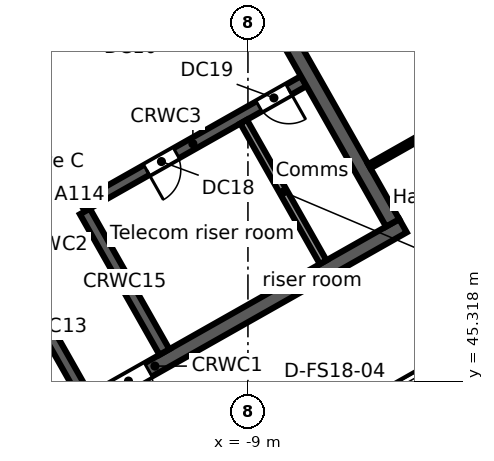
"""IFC4 building model, lengths in metres.
Left out: names, types, materials, properties, quantities, classifications, styles, units other than length and angle.
Written with IfcOpenShell. Run it as: python <this file> out.ifc"""

import sys

from ifc_helpers import new_model, si_unit, direction, frame, frame_2d, origin, place, context, subcontext, project, spatial, rectangle, extrude, element, fill, save


model = new_model("IFC4")
c1 = context("Model", 3, precision=1e-05, world=origin(), true_north=direction((0.0, 1.0)))
c2 = subcontext(c1, "Body", "Model", "MODEL_VIEW")
j1 = project(units=[si_unit("LENGTHUNIT", "METRE"), si_unit("PLANEANGLEUNIT", "RADIAN")], contexts=[c1])
p1 = place(None, origin())
s1 = spatial("IfcSite", under=j1, at=p1, CompositionType="ELEMENT")
p2 = place(p1, origin())
s2 = spatial("IfcBuilding", under=s1, at=p2, CompositionType="ELEMENT")
p3 = place(p2, frame((0.0, 0.0, 277.9)))
s3 = spatial("IfcBuildingStorey", under=s2, at=p3, CompositionType="ELEMENT", Elevation=277.9)
p4 = place(p3, frame((-58.732, 38.771, 0.0), z_axis=(0.0, 0.0, 1.0), x_axis=(0.870355615581, 0.492423702137, 0.0)))
e1 = element("IfcWall", 1, at=p4, inside=s3, PredefinedType="STANDARD", context=c2, shape_type="SweptSolid", body=[
    extrude(rectangle(XDim=64.052, YDim=0.25, at=frame_2d((32.026, 0.0))), origin(), (0.0, 0.0, 1.0), 3.52),
])
p5 = place(p4, frame((61.259, 0.0, 0.8)))
e2 = element("IfcOpeningElement", 2, at=p5, cuts=e1, PredefinedType="OPENING", context=c2, shape_type="SweptSolid", body=[
    extrude(rectangle(XDim=2.4, YDim=2.2, at=frame_2d((1.2, 1.1))), frame((0.0, 0.135, 0.0), z_axis=(0.0, -1.0, 0.0), x_axis=(1.0, 0.0, 0.0)), (0.0, 0.0, 1.0), 0.27),
])
p6 = place(p4, frame((58.216, 0.0, 0.8)))
e3 = element("IfcOpeningElement", 3, at=p6, cuts=e1, PredefinedType="OPENING", context=c2, shape_type="SweptSolid", body=[
    extrude(rectangle(XDim=2.4, YDim=2.2, at=frame_2d((1.2, 1.1))), frame((0.0, 0.135, 0.0), z_axis=(0.0, -1.0, 0.0), x_axis=(1.0, 0.0, 0.0)), (0.0, 0.0, 1.0), 0.27),
])
p7 = place(p4, frame((55.173, 0.0, 0.8)))
e4 = element("IfcOpeningElement", 4, at=p7, cuts=e1, PredefinedType="OPENING", context=c2, shape_type="SweptSolid", body=[
    extrude(rectangle(XDim=2.4, YDim=2.2, at=frame_2d((1.2, 1.1))), frame((0.0, 0.135, 0.0), z_axis=(0.0, -1.0, 0.0), x_axis=(1.0, 0.0, 0.0)), (0.0, 0.0, 1.0), 0.27),
])
p8 = place(p4, frame((52.129, 0.0, 0.8)))
e5 = element("IfcOpeningElement", 5, at=p8, cuts=e1, PredefinedType="OPENING", context=c2, shape_type="SweptSolid", body=[
    extrude(rectangle(XDim=2.4, YDim=2.2, at=frame_2d((1.2, 1.1))), frame((0.0, 0.135, 0.0), z_axis=(0.0, -1.0, 0.0), x_axis=(1.0, 0.0, 0.0)), (0.0, 0.0, 1.0), 0.27),
])
p9 = place(p4, frame((49.086, 0.0, 0.8)))
e6 = element("IfcOpeningElement", 6, at=p9, cuts=e1, PredefinedType="OPENING", context=c2, shape_type="SweptSolid", body=[
    extrude(rectangle(XDim=2.4, YDim=2.2, at=frame_2d((1.2, 1.1))), frame((0.0, 0.135, 0.0), z_axis=(0.0, -1.0, 0.0), x_axis=(1.0, 0.0, 0.0)), (0.0, 0.0, 1.0), 0.27),
])
p10 = place(p4, frame((46.043, 0.0, 0.8)))
e7 = element("IfcOpeningElement", 7, at=p10, cuts=e1, PredefinedType="OPENING", context=c2, shape_type="SweptSolid", body=[
    extrude(rectangle(XDim=2.4, YDim=2.2, at=frame_2d((1.2, 1.1))), frame((0.0, 0.135, 0.0), z_axis=(0.0, -1.0, 0.0), x_axis=(1.0, 0.0, 0.0)), (0.0, 0.0, 1.0), 0.27),
])
p11 = place(p4, frame((43.0, 0.0, 0.8)))
e8 = element("IfcOpeningElement", 8, at=p11, cuts=e1, PredefinedType="OPENING", context=c2, shape_type="SweptSolid", body=[
    extrude(rectangle(XDim=2.4, YDim=2.2, at=frame_2d((1.2, 1.1))), frame((0.0, 0.135, 0.0), z_axis=(0.0, -1.0, 0.0), x_axis=(1.0, 0.0, 0.0)), (0.0, 0.0, 1.0), 0.27),
])
p12 = place(p4, frame((39.956, 0.0, 0.8)))
e9 = element("IfcOpeningElement", 9, at=p12, cuts=e1, PredefinedType="OPENING", context=c2, shape_type="SweptSolid", body=[
    extrude(rectangle(XDim=2.4, YDim=2.2, at=frame_2d((1.2, 1.1))), frame((0.0, 0.135, 0.0), z_axis=(0.0, -1.0, 0.0), x_axis=(1.0, 0.0, 0.0)), (0.0, 0.0, 1.0), 0.27),
])
p13 = place(p4, frame((36.913, 0.0, 0.8)))
e10 = element("IfcOpeningElement", 10, at=p13, cuts=e1, PredefinedType="OPENING", context=c2, shape_type="SweptSolid", body=[
    extrude(rectangle(XDim=2.4, YDim=2.2, at=frame_2d((1.2, 1.1))), frame((0.0, 0.135, 0.0), z_axis=(0.0, -1.0, 0.0), x_axis=(1.0, 0.0, 0.0)), (0.0, 0.0, 1.0), 0.27),
])
p14 = place(p4, frame((33.87, 0.0, 0.8)))
e11 = element("IfcOpeningElement", 11, at=p14, cuts=e1, PredefinedType="OPENING", context=c2, shape_type="SweptSolid", body=[
    extrude(rectangle(XDim=2.4, YDim=2.2, at=frame_2d((1.2, 1.1))), frame((0.0, 0.135, 0.0), z_axis=(0.0, -1.0, 0.0), x_axis=(1.0, 0.0, 0.0)), (0.0, 0.0, 1.0), 0.27),
])
p15 = place(p4, frame((30.826, 0.0, 0.8)))
e12 = element("IfcOpeningElement", 12, at=p15, cuts=e1, PredefinedType="OPENING", context=c2, shape_type="SweptSolid", body=[
    extrude(rectangle(XDim=2.4, YDim=2.2, at=frame_2d((1.2, 1.1))), frame((0.0, 0.135, 0.0), z_axis=(0.0, -1.0, 0.0), x_axis=(1.0, 0.0, 0.0)), (0.0, 0.0, 1.0), 0.27),
])
p16 = place(p4, frame((27.783, 0.0, 0.8)))
e13 = element("IfcOpeningElement", 13, at=p16, cuts=e1, PredefinedType="OPENING", context=c2, shape_type="SweptSolid", body=[
    extrude(rectangle(XDim=2.4, YDim=2.2, at=frame_2d((1.2, 1.1))), frame((0.0, 0.135, 0.0), z_axis=(0.0, -1.0, 0.0), x_axis=(1.0, 0.0, 0.0)), (0.0, 0.0, 1.0), 0.27),
])
p17 = place(p4, frame((24.74, 0.0, 0.8)))
e14 = element("IfcOpeningElement", 14, at=p17, cuts=e1, PredefinedType="OPENING", context=c2, shape_type="SweptSolid", body=[
    extrude(rectangle(XDim=2.4, YDim=2.2, at=frame_2d((1.2, 1.1))), frame((0.0, 0.135, 0.0), z_axis=(0.0, -1.0, 0.0), x_axis=(1.0, 0.0, 0.0)), (0.0, 0.0, 1.0), 0.27),
])
p18 = place(p4, frame((21.696, 0.0, 0.8)))
e15 = element("IfcOpeningElement", 15, at=p18, cuts=e1, PredefinedType="OPENING", context=c2, shape_type="SweptSolid", body=[
    extrude(rectangle(XDim=2.4, YDim=2.2, at=frame_2d((1.2, 1.1))), frame((0.0, 0.135, 0.0), z_axis=(0.0, -1.0, 0.0), x_axis=(1.0, 0.0, 0.0)), (0.0, 0.0, 1.0), 0.27),
])
p19 = place(p4, frame((18.653, 0.0, 0.8)))
e16 = element("IfcOpeningElement", 16, at=p19, cuts=e1, PredefinedType="OPENING", context=c2, shape_type="SweptSolid", body=[
    extrude(rectangle(XDim=2.4, YDim=2.2, at=frame_2d((1.2, 1.1))), frame((0.0, 0.135, 0.0), z_axis=(0.0, -1.0, 0.0), x_axis=(1.0, 0.0, 0.0)), (0.0, 0.0, 1.0), 0.27),
])
p20 = place(p4, frame((15.61, 0.0, 0.8)))
e17 = element("IfcOpeningElement", 17, at=p20, cuts=e1, PredefinedType="OPENING", context=c2, shape_type="SweptSolid", body=[
    extrude(rectangle(XDim=2.4, YDim=2.2, at=frame_2d((1.2, 1.1))), frame((0.0, 0.135, 0.0), z_axis=(0.0, -1.0, 0.0), x_axis=(1.0, 0.0, 0.0)), (0.0, 0.0, 1.0), 0.27),
])
p21 = place(p4, frame((12.567, 0.0, 0.8)))
e18 = element("IfcOpeningElement", 18, at=p21, cuts=e1, PredefinedType="OPENING", context=c2, shape_type="SweptSolid", body=[
    extrude(rectangle(XDim=2.4, YDim=2.2, at=frame_2d((1.2, 1.1))), frame((0.0, 0.135, 0.0), z_axis=(0.0, -1.0, 0.0), x_axis=(1.0, 0.0, 0.0)), (0.0, 0.0, 1.0), 0.27),
])
p22 = place(p4, frame((9.523, 0.0, 0.8)))
e19 = element("IfcOpeningElement", 19, at=p22, cuts=e1, PredefinedType="OPENING", context=c2, shape_type="SweptSolid", body=[
    extrude(rectangle(XDim=2.4, YDim=2.2, at=frame_2d((1.2, 1.1))), frame((0.0, 0.135, 0.0), z_axis=(0.0, -1.0, 0.0), x_axis=(1.0, 0.0, 0.0)), (0.0, 0.0, 1.0), 0.27),
])
p23 = place(p4, frame((6.48, 0.0, 0.8)))
e20 = element("IfcOpeningElement", 20, at=p23, cuts=e1, PredefinedType="OPENING", context=c2, shape_type="SweptSolid", body=[
    extrude(rectangle(XDim=2.4, YDim=2.2, at=frame_2d((1.2, 1.1))), frame((0.0, 0.135, 0.0), z_axis=(0.0, -1.0, 0.0), x_axis=(1.0, 0.0, 0.0)), (0.0, 0.0, 1.0), 0.27),
])
p24 = place(p4, frame((3.437, 0.0, 0.8)))
e21 = element("IfcOpeningElement", 21, at=p24, cuts=e1, PredefinedType="OPENING", context=c2, shape_type="SweptSolid", body=[
    extrude(rectangle(XDim=2.4, YDim=2.2, at=frame_2d((1.2, 1.1))), frame((0.0, 0.135, 0.0), z_axis=(0.0, -1.0, 0.0), x_axis=(1.0, 0.0, 0.0)), (0.0, 0.0, 1.0), 0.27),
])
p25 = place(p4, frame((0.393, 0.0, 0.8)))
e22 = element("IfcOpeningElement", 22, at=p25, cuts=e1, PredefinedType="OPENING", context=c2, shape_type="SweptSolid", body=[
    extrude(rectangle(XDim=2.4, YDim=2.2, at=frame_2d((1.2, 1.1))), frame((0.0, 0.135, 0.0), z_axis=(0.0, -1.0, 0.0), x_axis=(1.0, 0.0, 0.0)), (0.0, 0.0, 1.0), 0.27),
])
p26 = place(p3, frame((-3.017, 46.293, 0.0), z_axis=(0.0, 0.0, 1.0), x_axis=(-0.870355474887, -0.492423950812, 0.0)))
e23 = element("IfcWall", 23, at=p26, inside=s3, PredefinedType="STANDARD", context=c2, shape_type="SweptSolid", body=[
    extrude(rectangle(XDim=40.34, YDim=0.25, at=frame_2d((20.17, 0.0))), origin(), (0.0, 0.0, 1.0), 3.52),
])
p27 = place(p26, frame((37.428, 0.0, 0.8)))
e24 = element("IfcOpeningElement", 24, at=p27, cuts=e23, PredefinedType="OPENING", context=c2, shape_type="SweptSolid", body=[
    extrude(rectangle(XDim=2.4, YDim=2.2, at=frame_2d((1.2, 1.1))), frame((0.0, 0.135, 0.0), z_axis=(0.0, -1.0, 0.0), x_axis=(1.0, 0.0, 0.0)), (0.0, 0.0, 1.0), 0.27),
])
p28 = place(p26, frame((34.372, 0.0, 0.0)))
e25 = element("IfcOpeningElement", 25, at=p28, cuts=e23, PredefinedType="OPENING", context=c2, shape_type="SweptSolid", body=[
    extrude(rectangle(XDim=1.8, YDim=2.4, at=frame_2d((0.9, 1.2))), frame((0.0, 0.135, 0.0), z_axis=(0.0, -1.0, 0.0), x_axis=(1.0, 0.0, 0.0)), (0.0, 0.0, 1.0), 0.27),
])
p29 = place(p26, frame((30.716, 0.0, 0.8)))
e26 = element("IfcOpeningElement", 26, at=p29, cuts=e23, PredefinedType="OPENING", context=c2, shape_type="SweptSolid", body=[
    extrude(rectangle(XDim=2.4, YDim=2.2, at=frame_2d((1.2, 1.1))), frame((0.0, 0.135, 0.0), z_axis=(0.0, -1.0, 0.0), x_axis=(1.0, 0.0, 0.0)), (0.0, 0.0, 1.0), 0.27),
])
p30 = place(p26, frame((27.36, 0.0, 0.8)))
e27 = element("IfcOpeningElement", 27, at=p30, cuts=e23, PredefinedType="OPENING", context=c2, shape_type="SweptSolid", body=[
    extrude(rectangle(XDim=2.4, YDim=2.2, at=frame_2d((1.2, 1.1))), frame((0.0, 0.135, 0.0), z_axis=(0.0, -1.0, 0.0), x_axis=(1.0, 0.0, 0.0)), (0.0, 0.0, 1.0), 0.27),
])
p31 = place(p26, frame((24.304, 0.0, 0.0)))
e28 = element("IfcOpeningElement", 28, at=p31, cuts=e23, PredefinedType="OPENING", context=c2, shape_type="SweptSolid", body=[
    extrude(rectangle(XDim=1.8, YDim=2.4, at=frame_2d((0.9, 1.2))), frame((0.0, 0.135, 0.0), z_axis=(0.0, -1.0, 0.0), x_axis=(1.0, 0.0, 0.0)), (0.0, 0.0, 1.0), 0.27),
])
p32 = place(p26, frame((20.648, 0.0, 0.8)))
e29 = element("IfcOpeningElement", 29, at=p32, cuts=e23, PredefinedType="OPENING", context=c2, shape_type="SweptSolid", body=[
    extrude(rectangle(XDim=2.4, YDim=2.2, at=frame_2d((1.2, 1.1))), frame((0.0, 0.135, 0.0), z_axis=(0.0, -1.0, 0.0), x_axis=(1.0, 0.0, 0.0)), (0.0, 0.0, 1.0), 0.27),
])
p33 = place(p26, frame((17.292, 0.0, 0.8)))
e30 = element("IfcOpeningElement", 30, at=p33, cuts=e23, PredefinedType="OPENING", context=c2, shape_type="SweptSolid", body=[
    extrude(rectangle(XDim=2.4, YDim=2.2, at=frame_2d((1.2, 1.1))), frame((0.0, 0.135, 0.0), z_axis=(0.0, -1.0, 0.0), x_axis=(1.0, 0.0, 0.0)), (0.0, 0.0, 1.0), 0.27),
])
p34 = place(p26, frame((14.236, 0.0, 0.0)))
e31 = element("IfcOpeningElement", 31, at=p34, cuts=e23, PredefinedType="OPENING", context=c2, shape_type="SweptSolid", body=[
    extrude(rectangle(XDim=1.8, YDim=2.4, at=frame_2d((0.9, 1.2))), frame((0.0, 0.135, 0.0), z_axis=(0.0, -1.0, 0.0), x_axis=(1.0, 0.0, 0.0)), (0.0, 0.0, 1.0), 0.27),
])
p35 = place(p26, frame((10.58, 0.0, 0.8)))
e32 = element("IfcOpeningElement", 32, at=p35, cuts=e23, PredefinedType="OPENING", context=c2, shape_type="SweptSolid", body=[
    extrude(rectangle(XDim=2.4, YDim=2.2, at=frame_2d((1.2, 1.1))), frame((0.0, 0.135, 0.0), z_axis=(0.0, -1.0, 0.0), x_axis=(1.0, 0.0, 0.0)), (0.0, 0.0, 1.0), 0.27),
])
p36 = place(p26, frame((7.224, 0.0, 0.8)))
e33 = element("IfcOpeningElement", 33, at=p36, cuts=e23, PredefinedType="OPENING", context=c2, shape_type="SweptSolid", body=[
    extrude(rectangle(XDim=2.4, YDim=2.2, at=frame_2d((1.2, 1.1))), frame((0.0, 0.135, 0.0), z_axis=(0.0, -1.0, 0.0), x_axis=(1.0, 0.0, 0.0)), (0.0, 0.0, 1.0), 0.27),
])
p37 = place(p26, frame((4.168, 0.0, 0.0)))
e34 = element("IfcOpeningElement", 34, at=p37, cuts=e23, PredefinedType="OPENING", context=c2, shape_type="SweptSolid", body=[
    extrude(rectangle(XDim=1.8, YDim=2.4, at=frame_2d((0.9, 1.2))), frame((0.0, 0.135, 0.0), z_axis=(0.0, -1.0, 0.0), x_axis=(1.0, 0.0, 0.0)), (0.0, 0.0, 1.0), 0.27),
])
p38 = place(p26, frame((0.512, 0.0, 0.8)))
e35 = element("IfcOpeningElement", 35, at=p38, cuts=e23, PredefinedType="OPENING", context=c2, shape_type="SweptSolid", body=[
    extrude(rectangle(XDim=2.4, YDim=2.2, at=frame_2d((1.2, 1.1))), frame((0.0, 0.135, 0.0), z_axis=(0.0, -1.0, 0.0), x_axis=(1.0, 0.0, 0.0)), (0.0, 0.0, 1.0), 0.27),
])
p39 = place(p3, frame((-17.975, 42.017, 0.0), z_axis=(0.0, 0.0, 1.0), x_axis=(0.87034965173, 0.492434243055, 0.0)))
e36 = element("IfcWall", 36, at=p39, inside=s3, PredefinedType="SOLIDWALL", context=c2, shape_type="SweptSolid", body=[
    extrude(rectangle(XDim=15.0, YDim=0.4, at=frame_2d((7.5, 0.0))), origin(), (0.0, 0.0, 1.0), 3.52),
])
p40 = place(p39, frame((6.1, 0.0, 0.0)))
e37 = element("IfcOpeningElement", 37, at=p40, cuts=e36, PredefinedType="OPENING", context=c2, shape_type="SweptSolid", body=[
    extrude(rectangle(XDim=1.2, YDim=2.1, at=frame_2d((0.6, 1.05))), frame((0.0, 0.21, 0.0), z_axis=(0.0, -1.0, 0.0), x_axis=(1.0, 0.0, 0.0)), (0.0, 0.0, 1.0), 0.42),
])
p41 = place(p3, frame((-13.365, 49.911, 0.0), z_axis=(0.0, 0.0, 1.0), x_axis=(0.870347618718, 0.492437836272, 0.0)))
e38 = element("IfcWall", 38, at=p41, inside=s3, PredefinedType="SOLIDWALL", context=c2, shape_type="SweptSolid", body=[
    extrude(rectangle(XDim=6.7, YDim=0.3, at=frame_2d((3.35, 0.0))), origin(), (0.0, 0.0, 1.0), 3.52),
])
p42 = place(p41, frame((1.95, 0.0, 0.0)))
e39 = element("IfcOpeningElement", 39, at=p42, cuts=e38, PredefinedType="OPENING", context=c2, shape_type="SweptSolid", body=[
    extrude(rectangle(XDim=0.9, YDim=2.1, at=frame_2d((0.45, 1.05))), frame((0.0, 0.16, 0.0), z_axis=(0.0, -1.0, 0.0), x_axis=(1.0, 0.0, 0.0)), (0.0, 0.0, 1.0), 0.32),
])
p43 = place(p41, frame((5.35, 0.0, 0.0)))
e40 = element("IfcOpeningElement", 40, at=p43, cuts=e38, PredefinedType="OPENING", context=c2, shape_type="SweptSolid", body=[
    extrude(rectangle(XDim=0.9, YDim=2.1, at=frame_2d((0.45, 1.05))), frame((0.0, 0.16, 0.0), z_axis=(0.0, -1.0, 0.0), x_axis=(1.0, 0.0, 0.0)), (0.0, 0.0, 1.0), 0.32),
])
p44 = place(p3, frame((-15.618, 53.691, 0.0), z_axis=(0.0, 0.0, 1.0), x_axis=(0.870362830851, 0.492410948978, 0.0)))
e41 = element("IfcWall", 41, at=p44, inside=s3, PredefinedType="SOLIDWALL", context=c2, shape_type="SweptSolid", body=[
    extrude(rectangle(XDim=6.8, YDim=0.3, at=frame_2d((3.4, 0.0))), origin(), (0.0, 0.0, 1.0), 3.52),
])
p45 = place(p44, frame((3.0, 0.0, 0.0)))
e42 = element("IfcOpeningElement", 42, at=p45, cuts=e41, PredefinedType="OPENING", context=c2, shape_type="SweptSolid", body=[
    extrude(rectangle(XDim=0.9, YDim=2.1, at=frame_2d((0.45, 1.05))), frame((0.0, 0.16, 0.0), z_axis=(0.0, -1.0, 0.0), x_axis=(1.0, 0.0, 0.0)), (0.0, 0.0, 1.0), 0.32),
])
p46 = place(p3, frame((-24.672, 53.854, 0.0), z_axis=(0.0, 0.0, 1.0), x_axis=(0.870353598469, 0.492427267353, 0.0)))
e43 = element("IfcWall", 43, at=p46, inside=s3, PredefinedType="SOLIDWALL", context=c2, shape_type="SweptSolid", body=[
    extrude(rectangle(XDim=15.0, YDim=0.4, at=frame_2d((7.5, 0.0))), origin(), (0.0, 0.0, 1.0), 3.52),
])
p47 = place(p3, frame((-15.379, 48.599, 0.0), z_axis=(0.0, 0.0, 1.0), x_axis=(0.492422543467, -0.870356271124, 0.0)))
e44 = element("IfcWall", 44, at=p47, inside=s3, PredefinedType="SOLIDWALL", context=c2, shape_type="SweptSolid", body=[
    extrude(rectangle(XDim=4.25, YDim=0.3, at=frame_2d((2.125, 0.0))), origin(), (0.0, 0.0, 1.0), 3.52),
])
p48 = place(p3, frame((-13.291, 49.781, 0.0), z_axis=(0.0, 0.0, 1.0), x_axis=(0.492397924348, -0.870370199454, 0.0)))
e45 = element("IfcWall", 45, at=p48, inside=s3, PredefinedType="SOLIDWALL", context=c2, shape_type="SweptSolid", body=[
    extrude(rectangle(XDim=4.25, YDim=0.3, at=frame_2d((2.125, 0.0))), origin(), (0.0, 0.0, 1.0), 3.52),
])
p49 = place(p3, frame((-9.113, 52.144, 0.0), z_axis=(0.0, 0.0, 1.0), x_axis=(0.492422543467, -0.870356271124, 0.0)))
e46 = element("IfcWall", 46, at=p49, inside=s3, PredefinedType="PARTITIONING", context=c2, shape_type="SweptSolid", body=[
    extrude(rectangle(XDim=4.25, YDim=0.2, at=frame_2d((2.125, 0.0))), origin(), (0.0, 0.0, 1.0), 3.52),
])
p50 = place(p3, frame((-11.692, 60.968, 0.0), z_axis=(0.0, 0.0, 1.0), x_axis=(0.492421663121, -0.870356769198, 0.0)))
e47 = element("IfcWall", 47, at=p50, inside=s3, PredefinedType="SOLIDWALL", context=c2, shape_type="SweptSolid", body=[
    extrude(rectangle(XDim=13.2, YDim=0.4, at=frame_2d((6.6, 0.0))), origin(), (0.0, 0.0, 1.0), 3.52),
])
p51 = place(p3, frame((-5.806, 50.97, 0.0), z_axis=(0.0, 0.0, 1.0), x_axis=(0.870355163327, 0.492424501492, 0.0)))
e48 = element("IfcWall", 48, at=p51, inside=s3, PredefinedType="PARTITIONING", context=c2, shape_type="SweptSolid", body=[
    extrude(rectangle(XDim=6.527, YDim=0.125, at=frame_2d((3.264, 0.0))), origin(), (0.0, 0.0, 1.0), 2.8),
])
p52 = place(p51, frame((2.45, 0.0, 0.0)))
e49 = element("IfcOpeningElement", 49, at=p52, cuts=e48, PredefinedType="OPENING", context=c2, shape_type="SweptSolid", body=[
    extrude(rectangle(XDim=1.8, YDim=2.1, at=frame_2d((0.9, 1.05))), frame((0.0, 0.073, 0.0), z_axis=(0.0, -1.0, 0.0), x_axis=(1.0, 0.0, 0.0)), (0.0, 0.0, 1.0), 0.145),
])
p53 = place(p38, origin())
e50 = element("IfcWindow", 50, at=p53, inside=s3, PartitioningType="SINGLE_PANEL", PredefinedType="WINDOW", context=c2, shape_type="SweptSolid", body=[
    extrude(rectangle(XDim=2.4, YDim=2.2, at=frame_2d((1.2, 1.1))), frame((0.0, 0.03, 0.0), z_axis=(0.0, -1.0, 0.0), x_axis=(1.0, 0.0, 0.0)), (0.0, 0.0, 1.0), 0.06),
])
fill(e35, e50)
p54 = place(p40, frame((1.2, 0.0, 0.0), z_axis=(0.0, 0.0, 1.0), x_axis=(-1.0, 0.0, 0.0)))
e51 = element("IfcDoor", 51, at=p54, inside=s3, OperationType="SINGLE_SWING_RIGHT", PredefinedType="DOOR", context=c2, shape_type="SweptSolid", body=[
    extrude(rectangle(XDim=1.2, YDim=2.1, at=frame_2d((0.6, 1.05))), frame((0.0, 0.025, 0.0), z_axis=(0.0, -1.0, 0.0), x_axis=(1.0, 0.0, 0.0)), (0.0, 0.0, 1.0), 0.05),
])
fill(e37, e51)
p55 = place(p42, frame((0.9, 0.0, 0.0), z_axis=(0.0, 0.0, 1.0), x_axis=(-1.0, 0.0, 0.0)))
e52 = element("IfcDoor", 52, at=p55, inside=s3, OperationType="SINGLE_SWING_RIGHT", PredefinedType="DOOR", context=c2, shape_type="SweptSolid", body=[
    extrude(rectangle(XDim=0.9, YDim=2.1, at=frame_2d((0.45, 1.05))), frame((0.0, 0.025, 0.0), z_axis=(0.0, -1.0, 0.0), x_axis=(1.0, 0.0, 0.0)), (0.0, 0.0, 1.0), 0.05),
])
fill(e39, e52)
p56 = place(p43, frame((0.9, 0.0, 0.0), z_axis=(0.0, 0.0, 1.0), x_axis=(-1.0, 0.0, 0.0)))
e53 = element("IfcDoor", 53, at=p56, inside=s3, OperationType="SINGLE_SWING_LEFT", PredefinedType="DOOR", context=c2, shape_type="SweptSolid", body=[
    extrude(rectangle(XDim=0.9, YDim=2.1, at=frame_2d((0.45, 1.05))), frame((0.0, 0.025, 0.0), z_axis=(0.0, -1.0, 0.0), x_axis=(1.0, 0.0, 0.0)), (0.0, 0.0, 1.0), 0.05),
])
fill(e40, e53)
save(model, sys.argv[1])
